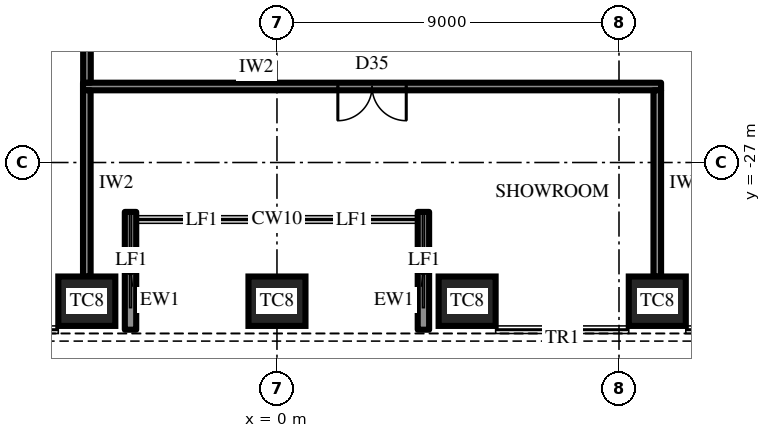
"""IFC4 building model, lengths in metres.
Left out: names, types, materials, properties, quantities, classifications, styles, units other than length and angle.
Written with IfcOpenShell. Run it as: python <this file> out.ifc"""

import sys

from ifc_helpers import new_model, si_unit, direction, frame, frame_2d, origin, origin_2d, place, context, subcontext, project, spatial, rectangle, extrude, element, fill, save


model = new_model("IFC4")
c1 = context("Model", 3, precision=1e-05, world=origin(), true_north=direction((0.0, 1.0)))
c2 = subcontext(c1, "Body", "Model", "MODEL_VIEW")
j1 = project(units=[si_unit("LENGTHUNIT", "METRE"), si_unit("PLANEANGLEUNIT", "RADIAN")], contexts=[c1])
p1 = place(None, origin())
s1 = spatial("IfcSite", under=j1, at=p1, CompositionType="ELEMENT")
p2 = place(p1, origin())
s2 = spatial("IfcBuilding", under=s1, at=p2, CompositionType="ELEMENT")
p3 = place(p2, frame((0.0, 0.0, 182.5)))
s3 = spatial("IfcBuildingStorey", under=s2, at=p3, CompositionType="ELEMENT", Elevation=182.5)
for number, where, z_axis, x_axis in (
    (1, (-5.004, -30.65, 0.0), (0.0, 0.0, 1.0), (1.0, 0.0, 0.0)),
    (2, (0.0, -30.65, 0.0), (0.0, 0.0, 1.0), (1.0, 0.0, 0.0)),
    (3, (5.004, -30.65, 0.0), (0.0, 0.0, 1.0), (1.0, 0.0, 0.0)),
    (4, (10.007, -30.65, 0.0), (0.0, 0.0, 1.0), (1.0, 0.0, 0.0)),
):
    element("IfcColumn", number, at=place(p3, frame(where, z_axis=z_axis, x_axis=x_axis)), inside=s3, PredefinedType="COLUMN", context=c2, shape_type="SweptSolid", body=[
        extrude(rectangle(XDim=1.5, YDim=1.3, at=origin_2d()), origin(), (0.0, 0.0, 1.0), 4.2),
    ])
for number, where, z_axis, x_axis in (
    (5, (-3.854, -31.4, 0.0), (0.0, 0.0, 1.0), (0.0, 1.0, 0.0)),
    (6, (3.854, -31.4, 0.0), (0.0, 0.0, 1.0), (0.0, 1.0, 0.0)),
):
    element("IfcWall", number, at=place(p3, frame(where, z_axis=z_axis, x_axis=x_axis)), inside=s3, PredefinedType="SOLIDWALL", context=c2, shape_type="SweptSolid", body=[
        extrude(rectangle(XDim=3.1, YDim=0.3, at=frame_2d((1.55, 0.0))), origin(), (0.0, 0.0, 1.0), 2.75),
    ])
p4 = place(p3, frame((-5.104, -25.0, 0.0), z_axis=(0.0, 0.0, 1.0), x_axis=(1.0, 0.0, 0.0)))
e7 = element("IfcWall", 7, at=p4, inside=s3, PredefinedType="PARTITIONING", context=c2, shape_type="SweptSolid", body=[
    extrude(rectangle(XDim=15.211, YDim=0.2, at=frame_2d((7.605, 0.0))), origin(), (0.0, 0.0, 1.0), 4.0),
])
p5 = place(p4, frame((6.706, 0.0, 0.0)))
e8 = element("IfcOpeningElement", 8, at=p5, cuts=e7, PredefinedType="OPENING", context=c2, shape_type="SweptSolid", body=[
    extrude(rectangle(XDim=1.8, YDim=2.4, at=frame_2d((0.9, 1.2))), frame((0.0, 0.11, 0.0), z_axis=(0.0, -1.0, 0.0), x_axis=(1.0, 0.0, 0.0)), (0.0, 0.0, 1.0), 0.22),
])
for number, where, z_axis, x_axis in (
    (9, (-5.004, -25.1, 0.0), (0.0, 0.0, 1.0), (0.0, -1.0, 0.0)),
    (10, (10.007, -25.1, 0.0), (0.0, 0.0, 1.0), (0.0, -1.0, 0.0)),
):
    element("IfcWall", number, at=place(p3, frame(where, z_axis=z_axis, x_axis=x_axis)), inside=s3, PredefinedType="PARTITIONING", context=c2, shape_type="SweptSolid", body=[
        extrude(rectangle(XDim=4.9, YDim=0.2, at=frame_2d((2.45, 0.0))), origin(), (0.0, 0.0, 1.0), 2.992),
    ])
p6 = place(p3, frame((-5.0, -18.7, 0.0), z_axis=(0.0, 0.0, 1.0), x_axis=(0.0, -1.0, 0.0)))
e11 = element("IfcWall", 11, at=p6, inside=s3, PredefinedType="PARTITIONING", context=c2, shape_type="SweptSolid", body=[
    extrude(rectangle(XDim=6.2, YDim=0.2, at=frame_2d((3.1, 0.0))), origin(), (0.0, 0.0, 1.0), 2.992),
])
p7 = place(p5, frame((1.8, 0.0, 0.0), z_axis=(0.0, 0.0, 1.0), x_axis=(-1.0, 0.0, 0.0)))
e12 = element("IfcDoor", 12, at=p7, inside=s3, OperationType="DOUBLE_DOOR_SINGLE_SWING", PredefinedType="DOOR", context=c2, shape_type="SweptSolid", body=[
    extrude(rectangle(XDim=1.8, YDim=2.4, at=frame_2d((0.9, 1.2))), frame((0.0, 0.025, 0.0), z_axis=(0.0, -1.0, 0.0), x_axis=(1.0, 0.0, 0.0)), (0.0, 0.0, 1.0), 0.05),
])
fill(e8, e12)
save(model, sys.argv[1])
